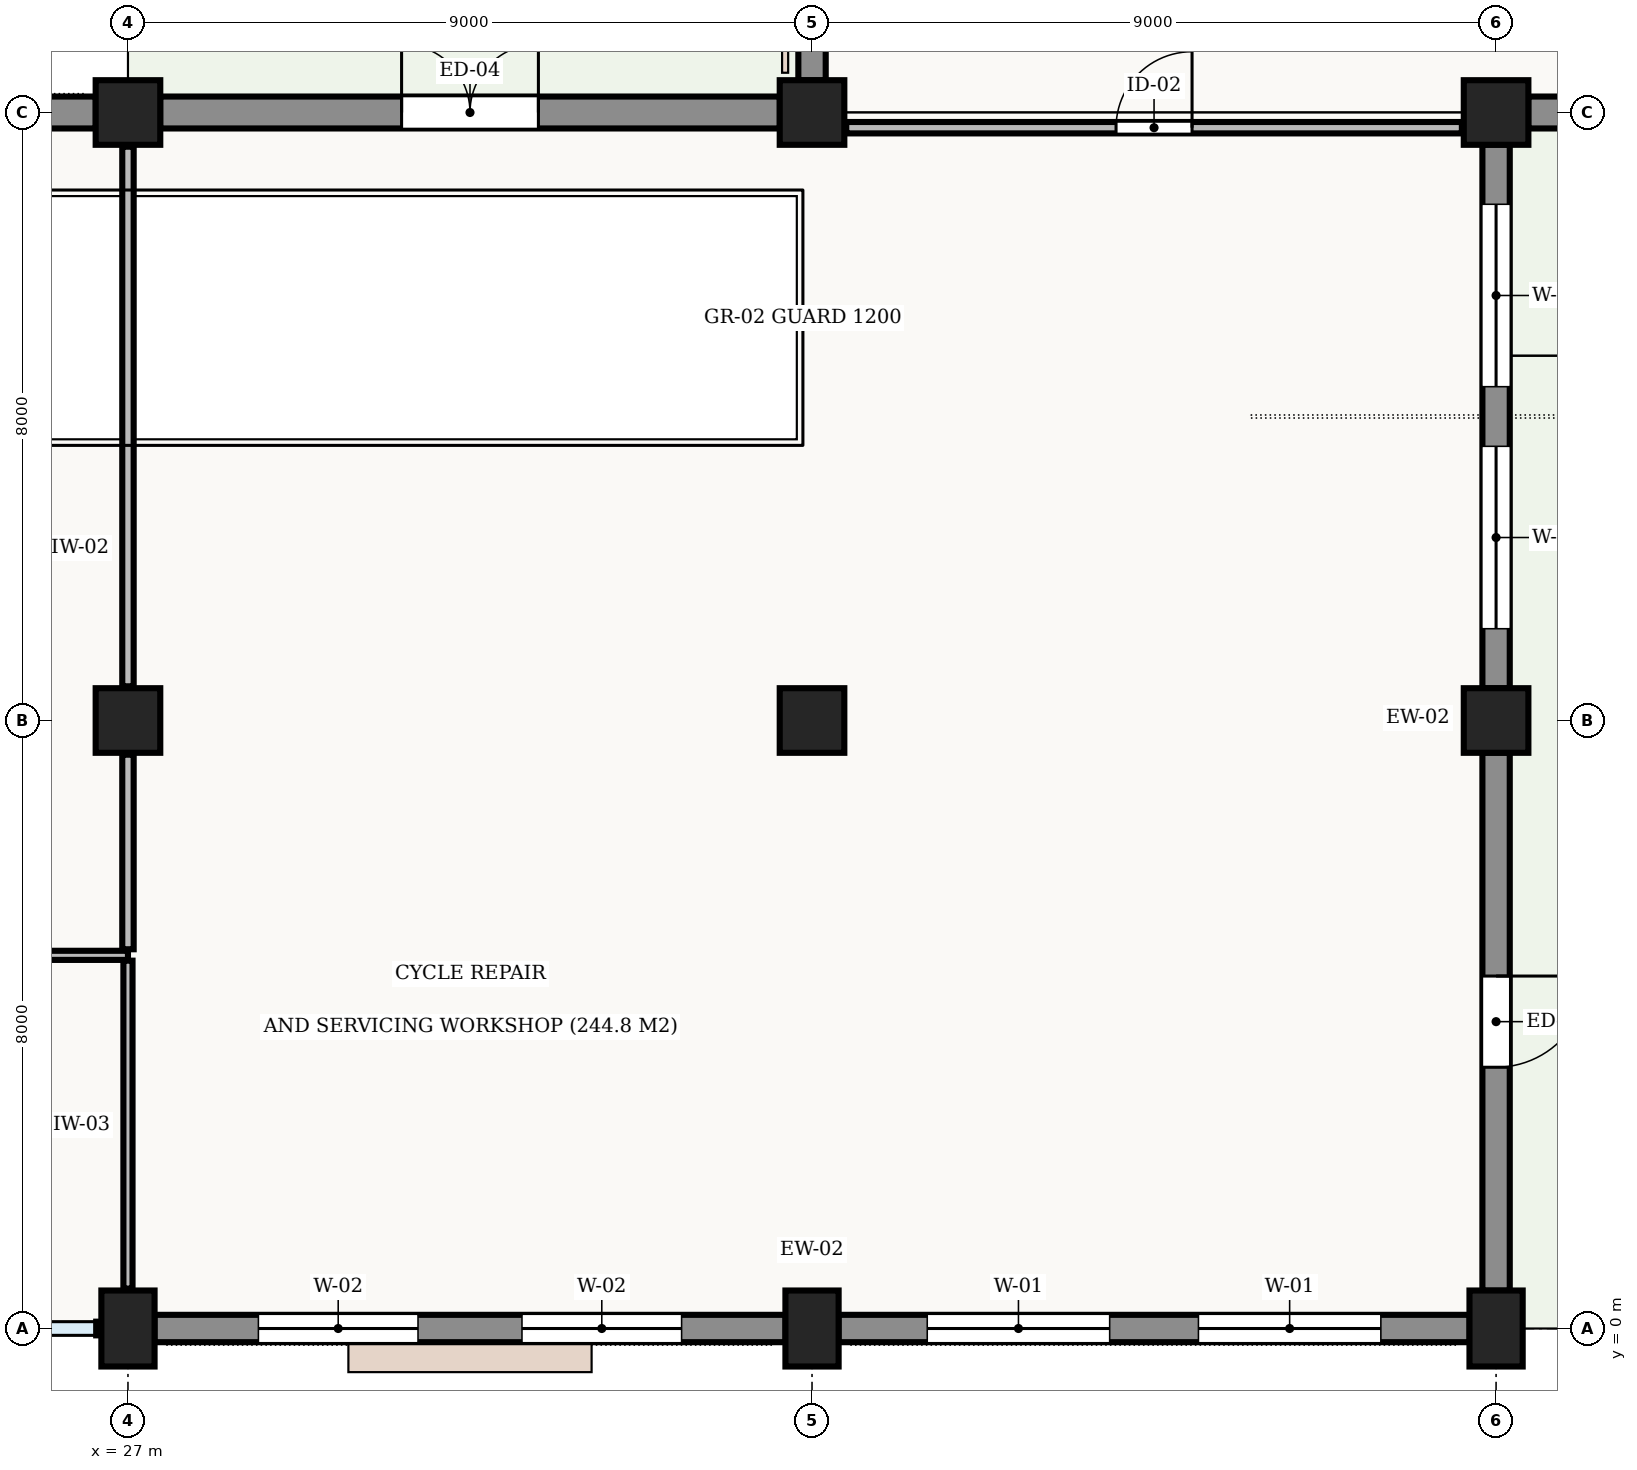
"""IFC4 building model, lengths in metres.
Left out: names, types, materials, properties, quantities, classifications, styles, units other than length and angle.
Written with IfcOpenShell. Run it as: python <this file> out.ifc"""

import sys

from ifc_helpers import new_model, si_unit, direction, frame, frame_2d, origin, origin_2d, place, context, subcontext, project, spatial, rectangle, extrude, element, fill, save


model = new_model("IFC4")
c1 = context("Model", 3, precision=1e-05, world=origin(), true_north=direction((0.0, 1.0)))
c2 = subcontext(c1, "Body", "Model", "MODEL_VIEW")
j1 = project(units=[si_unit("LENGTHUNIT", "METRE"), si_unit("PLANEANGLEUNIT", "RADIAN")], contexts=[c1])
p1 = place(None, origin())
s1 = spatial("IfcSite", under=j1, at=p1, CompositionType="ELEMENT")
p2 = place(p1, origin())
s2 = spatial("IfcBuilding", under=s1, at=p2, CompositionType="ELEMENT")
p3 = place(p2, origin())
s3 = spatial("IfcBuildingStorey", under=s2, at=p3, CompositionType="ELEMENT", Elevation=0.0)
p4 = place(p3, frame((27.0, 0.0, 0.0), z_axis=(0.0, 0.0, 1.0), x_axis=(1.0, 0.0, 0.0)))
e1 = element("IfcColumn", 1, at=p4, inside=s3, PredefinedType="COLUMN", context=c2, shape_type="SweptSolid", body=[
    extrude(rectangle(XDim=0.7, YDim=1.0, at=origin_2d()), origin(), (0.0, 0.0, 1.0), 5.4),
])
for number, where, z_axis, x_axis in (
    (2, (27.0, 8.0, 0.0), (0.0, 0.0, 1.0), (1.0, 0.0, 0.0)),
    (3, (27.0, 16.0, 0.0), (0.0, 0.0, 1.0), (1.0, 0.0, 0.0)),
):
    element("IfcColumn", number, at=place(p3, frame(where, z_axis=z_axis, x_axis=x_axis)), inside=s3, PredefinedType="COLUMN", context=c2, shape_type="SweptSolid", body=[
        extrude(rectangle(XDim=0.85, YDim=0.85, at=origin_2d()), origin(), (0.0, 0.0, 1.0), 5.4),
    ])
p5 = place(p3, frame((36.0, 0.0, 0.0), z_axis=(0.0, 0.0, 1.0), x_axis=(1.0, 0.0, 0.0)))
e4 = element("IfcColumn", 4, at=p5, inside=s3, PredefinedType="COLUMN", context=c2, shape_type="SweptSolid", body=[
    extrude(rectangle(XDim=0.7, YDim=1.0, at=origin_2d()), origin(), (0.0, 0.0, 1.0), 5.4),
])
for number, where, z_axis, x_axis in (
    (5, (36.0, 8.0, 0.0), (0.0, 0.0, 1.0), (1.0, 0.0, 0.0)),
    (6, (36.0, 16.0, 0.0), (0.0, 0.0, 1.0), (1.0, 0.0, 0.0)),
):
    element("IfcColumn", number, at=place(p3, frame(where, z_axis=z_axis, x_axis=x_axis)), inside=s3, PredefinedType="COLUMN", context=c2, shape_type="SweptSolid", body=[
        extrude(rectangle(XDim=0.85, YDim=0.85, at=origin_2d()), origin(), (0.0, 0.0, 1.0), 5.4),
    ])
p6 = place(p3, frame((45.0, 0.0, 0.0), z_axis=(0.0, 0.0, 1.0), x_axis=(1.0, 0.0, 0.0)))
e7 = element("IfcColumn", 7, at=p6, inside=s3, PredefinedType="COLUMN", context=c2, shape_type="SweptSolid", body=[
    extrude(rectangle(XDim=0.7, YDim=1.0, at=origin_2d()), origin(), (0.0, 0.0, 1.0), 5.4),
])
for number, where, z_axis, x_axis in (
    (8, (45.0, 8.0, 0.0), (0.0, 0.0, 1.0), (1.0, 0.0, 0.0)),
    (9, (45.0, 16.0, 0.0), (0.0, 0.0, 1.0), (1.0, 0.0, 0.0)),
):
    element("IfcColumn", number, at=place(p3, frame(where, z_axis=z_axis, x_axis=x_axis)), inside=s3, PredefinedType="COLUMN", context=c2, shape_type="SweptSolid", body=[
        extrude(rectangle(XDim=0.85, YDim=0.85, at=origin_2d()), origin(), (0.0, 0.0, 1.0), 5.4),
    ])
p7 = place(p3, frame((36.0, 16.423, 0.0), z_axis=(0.0, 0.0, 1.0), x_axis=(0.0, 1.0, 0.0)))
e10 = element("IfcWall", 10, at=p7, inside=s3, PredefinedType="STANDARD", context=c2, shape_type="SweptSolid", body=[
    extrude(rectangle(XDim=7.154, YDim=0.36, at=frame_2d((3.577, 0.0))), origin(), (0.0, 0.0, 1.0), 4.38),
])
p8 = place(p7, frame((0.985, 0.0, 0.9)))
e11 = element("IfcOpeningElement", 11, at=p8, cuts=e10, PredefinedType="OPENING", context=c2, shape_type="SweptSolid", body=[
    extrude(rectangle(XDim=2.1, YDim=3.0, at=frame_2d((1.05, 1.5))), frame((0.0, 0.192, 0.0), z_axis=(0.0, -1.0, 0.0), x_axis=(1.0, 0.0, 0.0)), (0.0, 0.0, 1.0), 0.384),
])
p9 = place(p7, frame((4.069, 0.0, 0.9)))
e12 = element("IfcOpeningElement", 12, at=p9, cuts=e10, PredefinedType="OPENING", context=c2, shape_type="SweptSolid", body=[
    extrude(rectangle(XDim=2.1, YDim=3.0, at=frame_2d((1.05, 1.5))), frame((0.0, 0.192, 0.0), z_axis=(0.0, -1.0, 0.0), x_axis=(1.0, 0.0, 0.0)), (0.0, 0.0, 1.0), 0.384),
])
p10 = place(p3, frame((53.577, 16.0, 0.0), z_axis=(0.0, 0.0, 1.0), x_axis=(-1.0, 0.0, 0.0)))
e13 = element("IfcWall", 13, at=p10, inside=s3, PredefinedType="STANDARD", context=c2, shape_type="SweptSolid", body=[
    extrude(rectangle(XDim=8.154, YDim=0.42, at=frame_2d((4.077, 0.0))), origin(), (0.0, 0.0, 1.0), 4.38),
])
p11 = place(p10, frame((2.877, 0.0, 0.0)))
e14 = element("IfcOpeningElement", 14, at=p11, cuts=e13, PredefinedType="OPENING", context=c2, shape_type="SweptSolid", body=[
    extrude(rectangle(XDim=2.4, YDim=2.7, at=frame_2d((1.2, 1.35))), frame((0.0, 0.222, 0.0), z_axis=(0.0, -1.0, 0.0), x_axis=(1.0, 0.0, 0.0)), (0.0, 0.0, 1.0), 0.444),
])
p12 = place(p3, frame((45.0, 15.577, 0.0), z_axis=(0.0, 0.0, 1.0), x_axis=(0.0, -1.0, 0.0)))
e15 = element("IfcWall", 15, at=p12, inside=s3, PredefinedType="STANDARD", context=c2, shape_type="SweptSolid", body=[
    extrude(rectangle(XDim=7.154, YDim=0.36, at=frame_2d((3.577, 0.0))), origin(), (0.0, 0.0, 1.0), 4.38),
])
p13 = place(p12, frame((0.785, 0.0, 0.9)))
e16 = element("IfcOpeningElement", 16, at=p13, cuts=e15, PredefinedType="OPENING", context=c2, shape_type="SweptSolid", body=[
    extrude(rectangle(XDim=2.4, YDim=3.2, at=frame_2d((1.2, 1.6))), frame((0.0, 0.192, 0.0), z_axis=(0.0, -1.0, 0.0), x_axis=(1.0, 0.0, 0.0)), (0.0, 0.0, 1.0), 0.384),
])
p14 = place(p12, frame((3.969, 0.0, 0.9)))
e17 = element("IfcOpeningElement", 17, at=p14, cuts=e15, PredefinedType="OPENING", context=c2, shape_type="SweptSolid", body=[
    extrude(rectangle(XDim=2.4, YDim=3.2, at=frame_2d((1.2, 1.6))), frame((0.0, 0.192, 0.0), z_axis=(0.0, -1.0, 0.0), x_axis=(1.0, 0.0, 0.0)), (0.0, 0.0, 1.0), 0.384),
])
p15 = place(p3, frame((45.0, 7.577, 0.0), z_axis=(0.0, 0.0, 1.0), x_axis=(0.0, -1.0, 0.0)))
e18 = element("IfcWall", 18, at=p15, inside=s3, PredefinedType="STANDARD", context=c2, shape_type="SweptSolid", body=[
    extrude(rectangle(XDim=7.079, YDim=0.36, at=frame_2d((3.54, 0.0))), origin(), (0.0, 0.0, 1.0), 4.38),
])
p16 = place(p15, frame((2.939, 0.0, 0.0)))
e19 = element("IfcOpeningElement", 19, at=p16, cuts=e18, PredefinedType="OPENING", context=c2, shape_type="SweptSolid", body=[
    extrude(rectangle(XDim=1.2, YDim=2.2, at=frame_2d((0.6, 1.1))), frame((0.0, 0.192, 0.0), z_axis=(0.0, -1.0, 0.0), x_axis=(1.0, 0.0, 0.0)), (0.0, 0.0, 1.0), 0.384),
])
p17 = place(p3, frame((44.652, 0.0, 0.0), z_axis=(0.0, 0.0, 1.0), x_axis=(-1.0, 0.0, 0.0)))
e20 = element("IfcWall", 20, at=p17, inside=s3, PredefinedType="STANDARD", context=c2, shape_type="SweptSolid", body=[
    extrude(rectangle(XDim=8.304, YDim=0.36, at=frame_2d((4.152, 0.0))), origin(), (0.0, 0.0, 1.0), 4.38),
])
p18 = place(p17, frame((1.168, 0.0, 0.9)))
e21 = element("IfcOpeningElement", 21, at=p18, cuts=e20, PredefinedType="OPENING", context=c2, shape_type="SweptSolid", body=[
    extrude(rectangle(XDim=2.4, YDim=3.2, at=frame_2d((1.2, 1.6))), frame((0.0, 0.192, 0.0), z_axis=(0.0, -1.0, 0.0), x_axis=(1.0, 0.0, 0.0)), (0.0, 0.0, 1.0), 0.384),
])
p19 = place(p17, frame((4.736, 0.0, 0.9)))
e22 = element("IfcOpeningElement", 22, at=p19, cuts=e20, PredefinedType="OPENING", context=c2, shape_type="SweptSolid", body=[
    extrude(rectangle(XDim=2.4, YDim=3.2, at=frame_2d((1.2, 1.6))), frame((0.0, 0.192, 0.0), z_axis=(0.0, -1.0, 0.0), x_axis=(1.0, 0.0, 0.0)), (0.0, 0.0, 1.0), 0.384),
])
p20 = place(p3, frame((35.652, 0.0, 0.0), z_axis=(0.0, 0.0, 1.0), x_axis=(-1.0, 0.0, 0.0)))
e23 = element("IfcWall", 23, at=p20, inside=s3, PredefinedType="STANDARD", context=c2, shape_type="SweptSolid", body=[
    extrude(rectangle(XDim=8.304, YDim=0.36, at=frame_2d((4.152, 0.0))), origin(), (0.0, 0.0, 1.0), 4.38),
])
p21 = place(p20, frame((1.368, 0.0, 0.9)))
e24 = element("IfcOpeningElement", 24, at=p21, cuts=e23, PredefinedType="OPENING", context=c2, shape_type="SweptSolid", body=[
    extrude(rectangle(XDim=2.1, YDim=3.0, at=frame_2d((1.05, 1.5))), frame((0.0, 0.192, 0.0), z_axis=(0.0, -1.0, 0.0), x_axis=(1.0, 0.0, 0.0)), (0.0, 0.0, 1.0), 0.384),
])
p22 = place(p20, frame((4.836, 0.0, 0.9)))
e25 = element("IfcOpeningElement", 25, at=p22, cuts=e23, PredefinedType="OPENING", context=c2, shape_type="SweptSolid", body=[
    extrude(rectangle(XDim=2.1, YDim=3.0, at=frame_2d((1.05, 1.5))), frame((0.0, 0.192, 0.0), z_axis=(0.0, -1.0, 0.0), x_axis=(1.0, 0.0, 0.0)), (0.0, 0.0, 1.0), 0.384),
])
p23 = place(p3, frame((18.423, 16.0, 0.0), z_axis=(0.0, 0.0, 1.0), x_axis=(1.0, 0.0, 0.0)))
e26 = element("IfcWall", 26, at=p23, inside=s3, PredefinedType="STANDARD", context=c2, shape_type="SweptSolid", body=[
    extrude(rectangle(XDim=8.154, YDim=0.42, at=frame_2d((4.077, 0.0))), origin(), (0.0, 0.0, 1.0), 4.38),
])
p24 = place(p23, frame((1.318, 0.0, 0.9)))
e27 = element("IfcOpeningElement", 27, at=p24, cuts=e26, PredefinedType="OPENING", context=c2, shape_type="SweptSolid", body=[
    extrude(rectangle(XDim=2.1, YDim=3.0, at=frame_2d((1.05, 1.5))), frame((0.0, 0.222, 0.0), z_axis=(0.0, -1.0, 0.0), x_axis=(1.0, 0.0, 0.0)), (0.0, 0.0, 1.0), 0.444),
])
p25 = place(p23, frame((4.736, 0.0, 0.9)))
e28 = element("IfcOpeningElement", 28, at=p25, cuts=e26, PredefinedType="OPENING", context=c2, shape_type="SweptSolid", body=[
    extrude(rectangle(XDim=2.1, YDim=3.0, at=frame_2d((1.05, 1.5))), frame((0.0, 0.222, 0.0), z_axis=(0.0, -1.0, 0.0), x_axis=(1.0, 0.0, 0.0)), (0.0, 0.0, 1.0), 0.444),
])
p26 = place(p3, frame((27.423, 16.0, 0.0), z_axis=(0.0, 0.0, 1.0), x_axis=(1.0, 0.0, 0.0)))
e29 = element("IfcWall", 29, at=p26, inside=s3, PredefinedType="STANDARD", context=c2, shape_type="SweptSolid", body=[
    extrude(rectangle(XDim=8.154, YDim=0.42, at=frame_2d((4.077, 0.0))), origin(), (0.0, 0.0, 1.0), 4.38),
])
p27 = place(p26, frame((3.177, 0.0, 0.0)))
e30 = element("IfcOpeningElement", 30, at=p27, cuts=e29, PredefinedType="OPENING", context=c2, shape_type="SweptSolid", body=[
    extrude(rectangle(XDim=1.8, YDim=2.4, at=frame_2d((0.9, 1.2))), frame((0.0, 0.222, 0.0), z_axis=(0.0, -1.0, 0.0), x_axis=(1.0, 0.0, 0.0)), (0.0, 0.0, 1.0), 0.444),
])
p28 = place(p3, frame((22.27, 4.91, 0.0), z_axis=(0.0, 0.0, 1.0), x_axis=(1.0, 0.0, 0.0)))
e31 = element("IfcWall", 31, at=p28, inside=s3, PredefinedType="STANDARD", context=c2, shape_type="SweptSolid", body=[
    extrude(rectangle(XDim=4.73, YDim=0.12, at=frame_2d((2.365, 0.0))), origin(), (0.0, 0.0, 1.0), 5.05),
])
p29 = place(p28, frame((1.582, 0.0, 0.0)))
e32 = element("IfcOpeningElement", 32, at=p29, cuts=e31, PredefinedType="OPENING", context=c2, shape_type="SweptSolid", body=[
    extrude(rectangle(XDim=0.95, YDim=2.1, at=frame_2d((0.475, 1.05))), frame((0.0, 0.072, 0.0), z_axis=(0.0, -1.0, 0.0), x_axis=(1.0, 0.0, 0.0)), (0.0, 0.0, 1.0), 0.144),
])
p30 = place(p3, frame((27.0, 0.525, 0.0), z_axis=(0.0, 0.0, 1.0), x_axis=(0.0, 1.0, 0.0)))
e33 = element("IfcWall", 33, at=p30, inside=s3, PredefinedType="STANDARD", context=c2, shape_type="SweptSolid", body=[
    extrude(rectangle(XDim=4.315, YDim=0.12, at=frame_2d((2.158, 0.0))), origin(), (0.0, 0.0, 1.0), 4.23),
])
p31 = place(p3, frame((36.45, 15.8, 0.0), z_axis=(0.0, 0.0, 1.0), x_axis=(1.0, 0.0, 0.0)))
e34 = element("IfcWall", 34, at=p31, inside=s3, PredefinedType="STANDARD", context=c2, shape_type="SweptSolid", body=[
    extrude(rectangle(XDim=8.1, YDim=0.15, at=frame_2d((4.05, 0.0))), origin(), (0.0, 0.0, 1.0), 4.23),
])
p32 = place(p31, frame((3.55, 0.0, 0.0)))
e35 = element("IfcOpeningElement", 35, at=p32, cuts=e34, PredefinedType="OPENING", context=c2, shape_type="SweptSolid", body=[
    extrude(rectangle(XDim=1.0, YDim=2.1, at=frame_2d((0.5, 1.05))), frame((0.0, 0.087, 0.0), z_axis=(0.0, -1.0, 0.0), x_axis=(1.0, 0.0, 0.0)), (0.0, 0.0, 1.0), 0.174),
])
p33 = place(p3, frame((27.0, 4.99, 0.0), z_axis=(0.0, 0.0, 1.0), x_axis=(0.0, 1.0, 0.0)))
e36 = element("IfcWall", 36, at=p33, inside=s3, PredefinedType="STANDARD", context=c2, shape_type="SweptSolid", body=[
    extrude(rectangle(XDim=2.56, YDim=0.15, at=frame_2d((1.28, 0.0))), origin(), (0.0, 0.0, 1.0), 4.23),
])
p34 = place(p3, frame((27.0, 8.45, 0.0), z_axis=(0.0, 0.0, 1.0), x_axis=(0.0, 1.0, 0.0)))
e37 = element("IfcWall", 37, at=p34, inside=s3, PredefinedType="STANDARD", context=c2, shape_type="SweptSolid", body=[
    extrude(rectangle(XDim=7.1, YDim=0.15, at=frame_2d((3.55, 0.0))), origin(), (0.0, 0.0, 1.0), 4.33),
])
p35 = place(p13, origin())
e38 = element("IfcWindow", 38, at=p35, inside=s3, PartitioningType="SINGLE_PANEL", PredefinedType="WINDOW", context=c2, shape_type="SweptSolid", body=[
    extrude(rectangle(XDim=2.4, YDim=3.2, at=frame_2d((1.2, 1.6))), frame((0.0, 0.03, 0.0), z_axis=(0.0, -1.0, 0.0), x_axis=(1.0, 0.0, 0.0)), (0.0, 0.0, 1.0), 0.06),
])
fill(e16, e38)
p36 = place(p14, origin())
e39 = element("IfcWindow", 39, at=p36, inside=s3, PartitioningType="SINGLE_PANEL", PredefinedType="WINDOW", context=c2, shape_type="SweptSolid", body=[
    extrude(rectangle(XDim=2.4, YDim=3.2, at=frame_2d((1.2, 1.6))), frame((0.0, 0.03, 0.0), z_axis=(0.0, -1.0, 0.0), x_axis=(1.0, 0.0, 0.0)), (0.0, 0.0, 1.0), 0.06),
])
fill(e17, e39)
p37 = place(p16, origin())
e40 = element("IfcDoor", 40, at=p37, inside=s3, OperationType="SINGLE_SWING_LEFT", PredefinedType="DOOR", context=c2, shape_type="SweptSolid", body=[
    extrude(rectangle(XDim=1.2, YDim=2.2, at=frame_2d((0.6, 1.1))), frame((0.0, 0.025, 0.0), z_axis=(0.0, -1.0, 0.0), x_axis=(1.0, 0.0, 0.0)), (0.0, 0.0, 1.0), 0.05),
])
fill(e19, e40)
p38 = place(p18, origin())
e41 = element("IfcWindow", 41, at=p38, inside=s3, PartitioningType="SINGLE_PANEL", PredefinedType="WINDOW", context=c2, shape_type="SweptSolid", body=[
    extrude(rectangle(XDim=2.4, YDim=3.2, at=frame_2d((1.2, 1.6))), frame((0.0, 0.03, 0.0), z_axis=(0.0, -1.0, 0.0), x_axis=(1.0, 0.0, 0.0)), (0.0, 0.0, 1.0), 0.06),
])
fill(e21, e41)
p39 = place(p19, origin())
e42 = element("IfcWindow", 42, at=p39, inside=s3, PartitioningType="SINGLE_PANEL", PredefinedType="WINDOW", context=c2, shape_type="SweptSolid", body=[
    extrude(rectangle(XDim=2.4, YDim=3.2, at=frame_2d((1.2, 1.6))), frame((0.0, 0.03, 0.0), z_axis=(0.0, -1.0, 0.0), x_axis=(1.0, 0.0, 0.0)), (0.0, 0.0, 1.0), 0.06),
])
fill(e22, e42)
p40 = place(p21, origin())
e43 = element("IfcWindow", 43, at=p40, inside=s3, PartitioningType="SINGLE_PANEL", PredefinedType="WINDOW", context=c2, shape_type="SweptSolid", body=[
    extrude(rectangle(XDim=2.1, YDim=3.0, at=frame_2d((1.05, 1.5))), frame((0.0, 0.03, 0.0), z_axis=(0.0, -1.0, 0.0), x_axis=(1.0, 0.0, 0.0)), (0.0, 0.0, 1.0), 0.06),
])
fill(e24, e43)
p41 = place(p22, origin())
e44 = element("IfcWindow", 44, at=p41, inside=s3, PartitioningType="SINGLE_PANEL", PredefinedType="WINDOW", context=c2, shape_type="SweptSolid", body=[
    extrude(rectangle(XDim=2.1, YDim=3.0, at=frame_2d((1.05, 1.5))), frame((0.0, 0.03, 0.0), z_axis=(0.0, -1.0, 0.0), x_axis=(1.0, 0.0, 0.0)), (0.0, 0.0, 1.0), 0.06),
])
fill(e25, e44)
p42 = place(p27, origin())
e45 = element("IfcDoor", 45, at=p42, inside=s3, OperationType="SINGLE_SWING_LEFT", PredefinedType="DOOR", context=c2, shape_type="SweptSolid", body=[
    extrude(rectangle(XDim=1.8, YDim=2.4, at=frame_2d((0.9, 1.2))), frame((0.0, 0.025, 0.0), z_axis=(0.0, -1.0, 0.0), x_axis=(1.0, 0.0, 0.0)), (0.0, 0.0, 1.0), 0.05),
])
fill(e30, e45)
p43 = place(p32, origin())
e46 = element("IfcDoor", 46, at=p43, inside=s3, OperationType="SINGLE_SWING_RIGHT", PredefinedType="DOOR", context=c2, shape_type="SweptSolid", body=[
    extrude(rectangle(XDim=1.0, YDim=2.1, at=frame_2d((0.5, 1.05))), frame((0.0, 0.025, 0.0), z_axis=(0.0, -1.0, 0.0), x_axis=(1.0, 0.0, 0.0)), (0.0, 0.0, 1.0), 0.05),
])
fill(e35, e46)
save(model, sys.argv[1])
